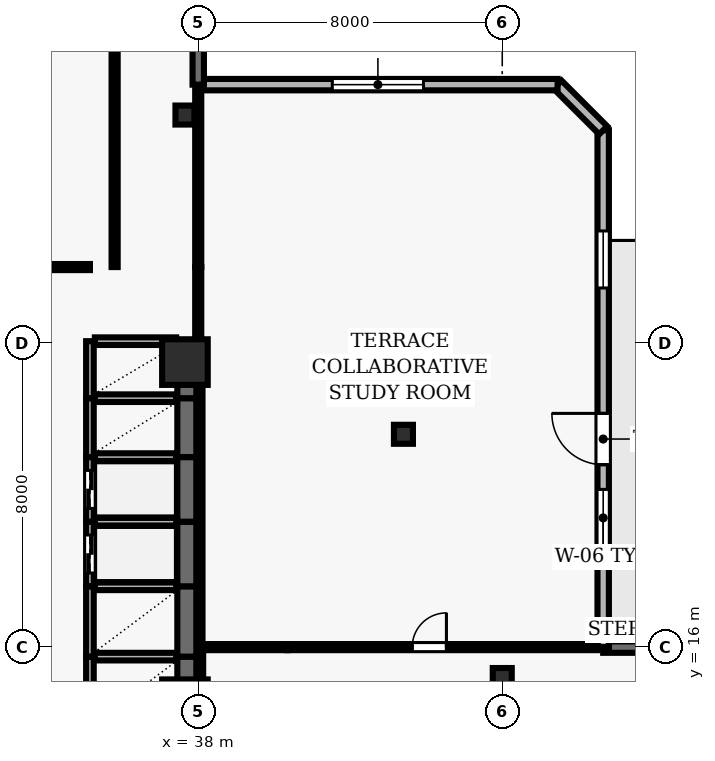
"""IFC4 building model, lengths in metres.
Left out: names, types, materials, properties, quantities, classifications, styles, units other than length and angle.
Written with IfcOpenShell. Run it as: python <this file> out.ifc"""

import sys

from ifc_helpers import new_model, si_unit, direction, frame, frame_2d, origin, origin_2d, place, context, subcontext, project, spatial, rectangle, hollow_rectangle, extrude, element, fill, save


model = new_model("IFC4")
c1 = context("Model", 3, precision=1e-05, world=origin(), true_north=direction((0.0, 1.0)))
c2 = subcontext(c1, "Body", "Model", "MODEL_VIEW")
j1 = project(units=[si_unit("LENGTHUNIT", "METRE"), si_unit("PLANEANGLEUNIT", "RADIAN")], contexts=[c1])
p1 = place(None, origin())
s1 = spatial("IfcSite", under=j1, at=p1, CompositionType="ELEMENT")
p2 = place(p1, origin())
s2 = spatial("IfcBuilding", under=s1, at=p2, CompositionType="ELEMENT")
p3 = place(p2, frame((0.0, 0.0, 103.4)))
s3 = spatial("IfcBuildingStorey", under=s2, at=p3, CompositionType="ELEMENT", Elevation=103.4)
for number, where, z_axis, x_axis in (
    (1, (37.65, 14.55, 0.0), (0.0, 0.0, 1.0), (1.0, 0.0, 0.0)),
    (2, (37.65, 23.5, 0.0), (0.0, 0.0, 1.0), (1.0, 0.0, 0.0)),
):
    element("IfcColumn", number, at=place(p3, frame(where, z_axis=z_axis, x_axis=x_axis)), inside=s3, PredefinedType="COLUMN", context=c2, shape_type="SweptSolid", body=[
        extrude(rectangle(XDim=1.2, YDim=1.2, at=origin_2d()), origin(), (0.0, 0.0, 1.0), 3.9),
    ])
for number, where, z_axis, x_axis in (
    (3, (46.0, 15.2, 0.0), (0.0, 0.0, 1.0), (1.0, 0.0, 0.0)),
    (4, (37.65, 30.0, 0.0), (0.0, 0.0, 1.0), (1.0, 0.0, 0.0)),
    (5, (43.4, 21.6, 0.0), (0.0, 0.0, 1.0), (1.0, 0.0, 0.0)),
):
    element("IfcColumn", number, at=place(p3, frame(where, z_axis=z_axis, x_axis=x_axis)), inside=s3, PredefinedType="COLUMN", context=c2, shape_type="SweptSolid", body=[
        extrude(hollow_rectangle(XDim=0.5, YDim=0.5, WallThickness=0.025, at=origin_2d()), origin(), (0.0, 0.0, 1.0), 3.9),
    ])
p4 = place(p3, frame((68.1, 16.0, 0.0), z_axis=(0.0, 0.0, 1.0), x_axis=(-1.0, 0.0, 0.0)))
e6 = element("IfcWall", 6, at=p4, inside=s3, PredefinedType="SOLIDWALL", context=c2, shape_type="SweptSolid", body=[
    extrude(rectangle(XDim=19.444, YDim=0.3, at=frame_2d((9.722, 0.0))), origin(), (0.0, 0.0, 1.0), 3.69),
])
p5 = place(p4, frame((7.05, 0.0, 0.0)))
e7 = element("IfcOpeningElement", 7, at=p5, cuts=e6, PredefinedType="OPENING", context=c2, shape_type="SweptSolid", body=[
    extrude(rectangle(XDim=1.0, YDim=2.2, at=frame_2d((0.5, 1.1))), frame((0.0, 0.16, 0.0), z_axis=(0.0, -1.0, 0.0), x_axis=(1.0, 0.0, 0.0)), (0.0, 0.0, 1.0), 0.32),
])
p6 = place(p4, frame((2.041, 0.0, 0.9)))
e8 = element("IfcOpeningElement", 8, at=p6, cuts=e6, PredefinedType="OPENING", context=c2, shape_type="SweptSolid", body=[
    extrude(rectangle(XDim=2.4, YDim=1.6, at=frame_2d((1.2, 0.8))), frame((0.0, 0.16, 0.0), z_axis=(0.0, -1.0, 0.0), x_axis=(1.0, 0.0, 0.0)), (0.0, 0.0, 1.0), 0.32),
])
p7 = place(p4, frame((8.522, 0.0, 0.9)))
e9 = element("IfcOpeningElement", 9, at=p7, cuts=e6, PredefinedType="OPENING", context=c2, shape_type="SweptSolid", body=[
    extrude(rectangle(XDim=2.4, YDim=1.6, at=frame_2d((1.2, 0.8))), frame((0.0, 0.16, 0.0), z_axis=(0.0, -1.0, 0.0), x_axis=(1.0, 0.0, 0.0)), (0.0, 0.0, 1.0), 0.32),
])
p8 = place(p4, frame((15.003, 0.0, 0.9)))
e10 = element("IfcOpeningElement", 10, at=p8, cuts=e6, PredefinedType="OPENING", context=c2, shape_type="SweptSolid", body=[
    extrude(rectangle(XDim=2.4, YDim=1.6, at=frame_2d((1.2, 0.8))), frame((0.0, 0.16, 0.0), z_axis=(0.0, -1.0, 0.0), x_axis=(1.0, 0.0, 0.0)), (0.0, 0.0, 1.0), 0.32),
])
p9 = place(p3, frame((48.656, 16.0, 0.0), z_axis=(0.0, 0.0, 1.0), x_axis=(0.0, 1.0, 0.0)))
e11 = element("IfcWall", 11, at=p9, inside=s3, PredefinedType="SOLIDWALL", context=c2, shape_type="SweptSolid", body=[
    extrude(rectangle(XDim=13.6, YDim=0.3, at=frame_2d((6.8, 0.0))), origin(), (0.0, 0.0, 1.0), 3.69),
])
p10 = place(p9, frame((4.8, 0.0, 0.0)))
e12 = element("IfcOpeningElement", 12, at=p10, cuts=e11, PredefinedType="OPENING", context=c2, shape_type="SweptSolid", body=[
    extrude(rectangle(XDim=1.35, YDim=2.2, at=frame_2d((0.675, 1.1))), frame((0.0, 0.16, 0.0), z_axis=(0.0, -1.0, 0.0), x_axis=(1.0, 0.0, 0.0)), (0.0, 0.0, 1.0), 0.32),
])
p11 = place(p9, frame((2.65, 0.0, 0.9)))
e13 = element("IfcOpeningElement", 13, at=p11, cuts=e11, PredefinedType="OPENING", context=c2, shape_type="SweptSolid", body=[
    extrude(rectangle(XDim=1.5, YDim=1.8, at=frame_2d((0.75, 0.9))), frame((0.0, 0.16, 0.0), z_axis=(0.0, -1.0, 0.0), x_axis=(1.0, 0.0, 0.0)), (0.0, 0.0, 1.0), 0.32),
])
p12 = place(p9, frame((9.45, 0.0, 0.9)))
e14 = element("IfcOpeningElement", 14, at=p12, cuts=e11, PredefinedType="OPENING", context=c2, shape_type="SweptSolid", body=[
    extrude(rectangle(XDim=1.5, YDim=1.8, at=frame_2d((0.75, 0.9))), frame((0.0, 0.16, 0.0), z_axis=(0.0, -1.0, 0.0), x_axis=(1.0, 0.0, 0.0)), (0.0, 0.0, 1.0), 0.32),
])
p13 = place(p3, frame((48.656, 29.6, 0.0), z_axis=(0.0, 0.0, 1.0), x_axis=(-0.707106781187, 0.707106781187, 0.0)))
e15 = element("IfcWall", 15, at=p13, inside=s3, PredefinedType="SOLIDWALL", context=c2, shape_type="SweptSolid", body=[
    extrude(rectangle(XDim=1.697, YDim=0.3, at=frame_2d((0.849, 0.0))), origin(), (0.0, 0.0, 1.0), 3.69),
])
p14 = place(p3, frame((47.456, 30.8, 0.0), z_axis=(0.0, 0.0, 1.0), x_axis=(-1.0, 0.0, 0.0)))
e16 = element("IfcWall", 16, at=p14, inside=s3, PredefinedType="SOLIDWALL", context=c2, shape_type="SweptSolid", body=[
    extrude(rectangle(XDim=9.456, YDim=0.3, at=frame_2d((4.728, 0.0))), origin(), (0.0, 0.0, 1.0), 3.69),
])
p15 = place(p14, frame((3.528, 0.0, 0.9)))
e17 = element("IfcOpeningElement", 17, at=p15, cuts=e16, PredefinedType="OPENING", context=c2, shape_type="SweptSolid", body=[
    extrude(rectangle(XDim=2.4, YDim=1.8, at=frame_2d((1.2, 0.9))), frame((0.0, 0.16, 0.0), z_axis=(0.0, -1.0, 0.0), x_axis=(1.0, 0.0, 0.0)), (0.0, 0.0, 1.0), 0.32),
])
p16 = place(p3, frame((38.0, 30.8, 0.0), z_axis=(0.0, 0.0, 1.0), x_axis=(0.0, 1.0, 0.0)))
e18 = element("IfcWall", 18, at=p16, inside=s3, PredefinedType="SOLIDWALL", context=c2, shape_type="SweptSolid", body=[
    extrude(rectangle(XDim=15.3, YDim=0.3, at=frame_2d((7.65, 0.0))), origin(), (0.0, 0.0, 1.0), 3.69),
])
p17 = place(p16, frame((7.25, 0.0, 0.0)))
e19 = element("IfcOpeningElement", 19, at=p17, cuts=e18, PredefinedType="OPENING", context=c2, shape_type="SweptSolid", body=[
    extrude(rectangle(XDim=1.0, YDim=2.2, at=frame_2d((0.5, 1.1))), frame((0.0, 0.16, 0.0), z_axis=(0.0, -1.0, 0.0), x_axis=(1.0, 0.0, 0.0)), (0.0, 0.0, 1.0), 0.32),
])
p18 = place(p16, frame((1.525, 0.0, 0.9)))
e20 = element("IfcOpeningElement", 20, at=p18, cuts=e18, PredefinedType="OPENING", context=c2, shape_type="SweptSolid", body=[
    extrude(rectangle(XDim=2.8, YDim=1.8, at=frame_2d((1.4, 0.9))), frame((0.0, 0.16, 0.0), z_axis=(0.0, -1.0, 0.0), x_axis=(1.0, 0.0, 0.0)), (0.0, 0.0, 1.0), 0.32),
])
p19 = place(p16, frame((10.975, 0.0, 0.9)))
e21 = element("IfcOpeningElement", 21, at=p19, cuts=e18, PredefinedType="OPENING", context=c2, shape_type="SweptSolid", body=[
    extrude(rectangle(XDim=2.8, YDim=1.8, at=frame_2d((1.4, 0.9))), frame((0.0, 0.16, 0.0), z_axis=(0.0, -1.0, 0.0), x_axis=(1.0, 0.0, 0.0)), (0.0, 0.0, 1.0), 0.32),
])
p20 = place(p3, frame((35.15, 15.75, 0.0), z_axis=(0.0, 0.0, 1.0), x_axis=(0.0, -1.0, 0.0)))
e22 = element("IfcWall", 22, at=p20, inside=s3, PredefinedType="SOLIDWALL", context=c2, shape_type="SweptSolid", body=[
    extrude(rectangle(XDim=1.85, YDim=0.2, at=frame_2d((0.925, 0.0))), origin(), (0.0, 0.0, 1.0), 3.69),
])
p21 = place(p3, frame((37.7, 13.9, 0.0), z_axis=(0.0, 0.0, 1.0), x_axis=(0.0, 1.0, 0.0)))
e23 = element("IfcWall", 23, at=p21, inside=s3, PredefinedType="SHEAR", context=c2, shape_type="SweptSolid", body=[
    extrude(rectangle(XDim=1.85, YDim=0.5, at=frame_2d((0.925, 0.0))), origin(), (0.0, 0.0, 1.0), 3.69),
])
p22 = place(p3, frame((37.42, 15.75, 0.0), z_axis=(0.0, 0.0, 1.0), x_axis=(-1.0, 0.0, 0.0)))
e24 = element("IfcWall", 24, at=p22, inside=s3, PredefinedType="SOLIDWALL", context=c2, shape_type="SweptSolid", body=[
    extrude(rectangle(XDim=2.14, YDim=0.2, at=frame_2d((1.07, 0.0))), origin(), (0.0, 0.0, 1.0), 3.69),
])
p23 = place(p3, frame((35.15, 17.6, 0.0), z_axis=(0.0, 0.0, 1.0), x_axis=(0.0, -1.0, 0.0)))
e25 = element("IfcWall", 25, at=p23, inside=s3, PredefinedType="SOLIDWALL", context=c2, shape_type="SweptSolid", body=[
    extrude(rectangle(XDim=1.85, YDim=0.2, at=frame_2d((0.925, 0.0))), origin(), (0.0, 0.0, 1.0), 3.69),
])
p24 = place(p3, frame((37.7, 15.75, 0.0), z_axis=(0.0, 0.0, 1.0), x_axis=(0.0, 1.0, 0.0)))
e26 = element("IfcWall", 26, at=p24, inside=s3, PredefinedType="SHEAR", context=c2, shape_type="SweptSolid", body=[
    extrude(rectangle(XDim=1.85, YDim=0.5, at=frame_2d((0.925, 0.0))), origin(), (0.0, 0.0, 1.0), 3.69),
])
p25 = place(p3, frame((37.42, 17.6, 0.0), z_axis=(0.0, 0.0, 1.0), x_axis=(-1.0, 0.0, 0.0)))
e27 = element("IfcWall", 27, at=p25, inside=s3, PredefinedType="SOLIDWALL", context=c2, shape_type="SweptSolid", body=[
    extrude(rectangle(XDim=2.14, YDim=0.2, at=frame_2d((1.07, 0.0))), origin(), (0.0, 0.0, 1.0), 3.69),
])
p26 = place(p3, frame((35.15, 19.3, 0.0), z_axis=(0.0, 0.0, 1.0), x_axis=(0.0, -1.0, 0.0)))
e28 = element("IfcWall", 28, at=p26, inside=s3, PredefinedType="SOLIDWALL", context=c2, shape_type="SweptSolid", body=[
    extrude(rectangle(XDim=1.7, YDim=0.2, at=frame_2d((0.85, 0.0))), origin(), (0.0, 0.0, 1.0), 3.69),
])
p27 = place(p26, frame((0.35, 0.0, 0.0)))
e29 = element("IfcOpeningElement", 29, at=p27, cuts=e28, PredefinedType="OPENING", context=c2, shape_type="SweptSolid", body=[
    extrude(rectangle(XDim=1.0, YDim=2.1, at=frame_2d((0.5, 1.05))), frame((0.0, 0.11, 0.0), z_axis=(0.0, -1.0, 0.0), x_axis=(1.0, 0.0, 0.0)), (0.0, 0.0, 1.0), 0.22),
])
p28 = place(p3, frame((37.7, 17.6, 0.0), z_axis=(0.0, 0.0, 1.0), x_axis=(0.0, 1.0, 0.0)))
e30 = element("IfcWall", 30, at=p28, inside=s3, PredefinedType="SHEAR", context=c2, shape_type="SweptSolid", body=[
    extrude(rectangle(XDim=1.7, YDim=0.5, at=frame_2d((0.85, 0.0))), origin(), (0.0, 0.0, 1.0), 3.69),
])
p29 = place(p3, frame((37.42, 19.3, 0.0), z_axis=(0.0, 0.0, 1.0), x_axis=(-1.0, 0.0, 0.0)))
e31 = element("IfcWall", 31, at=p29, inside=s3, PredefinedType="SOLIDWALL", context=c2, shape_type="SweptSolid", body=[
    extrude(rectangle(XDim=2.14, YDim=0.2, at=frame_2d((1.07, 0.0))), origin(), (0.0, 0.0, 1.0), 3.69),
])
p30 = place(p3, frame((35.15, 21.0, 0.0), z_axis=(0.0, 0.0, 1.0), x_axis=(0.0, -1.0, 0.0)))
e32 = element("IfcWall", 32, at=p30, inside=s3, PredefinedType="SOLIDWALL", context=c2, shape_type="SweptSolid", body=[
    extrude(rectangle(XDim=1.7, YDim=0.2, at=frame_2d((0.85, 0.0))), origin(), (0.0, 0.0, 1.0), 3.69),
])
p31 = place(p30, frame((0.35, 0.0, 0.0)))
e33 = element("IfcOpeningElement", 33, at=p31, cuts=e32, PredefinedType="OPENING", context=c2, shape_type="SweptSolid", body=[
    extrude(rectangle(XDim=1.0, YDim=2.1, at=frame_2d((0.5, 1.05))), frame((0.0, 0.11, 0.0), z_axis=(0.0, -1.0, 0.0), x_axis=(1.0, 0.0, 0.0)), (0.0, 0.0, 1.0), 0.22),
])
p32 = place(p3, frame((37.7, 19.3, 0.0), z_axis=(0.0, 0.0, 1.0), x_axis=(0.0, 1.0, 0.0)))
e34 = element("IfcWall", 34, at=p32, inside=s3, PredefinedType="SHEAR", context=c2, shape_type="SweptSolid", body=[
    extrude(rectangle(XDim=1.7, YDim=0.5, at=frame_2d((0.85, 0.0))), origin(), (0.0, 0.0, 1.0), 3.69),
])
p33 = place(p3, frame((37.42, 21.0, 0.0), z_axis=(0.0, 0.0, 1.0), x_axis=(-1.0, 0.0, 0.0)))
e35 = element("IfcWall", 35, at=p33, inside=s3, PredefinedType="SOLIDWALL", context=c2, shape_type="SweptSolid", body=[
    extrude(rectangle(XDim=2.14, YDim=0.2, at=frame_2d((1.07, 0.0))), origin(), (0.0, 0.0, 1.0), 3.69),
])
p34 = place(p3, frame((35.15, 22.55, 0.0), z_axis=(0.0, 0.0, 1.0), x_axis=(0.0, -1.0, 0.0)))
e36 = element("IfcWall", 36, at=p34, inside=s3, PredefinedType="SOLIDWALL", context=c2, shape_type="SweptSolid", body=[
    extrude(rectangle(XDim=1.55, YDim=0.2, at=frame_2d((0.775, 0.0))), origin(), (0.0, 0.0, 1.0), 3.69),
])
p35 = place(p3, frame((37.7, 21.0, 0.0), z_axis=(0.0, 0.0, 1.0), x_axis=(0.0, 1.0, 0.0)))
e37 = element("IfcWall", 37, at=p35, inside=s3, PredefinedType="SHEAR", context=c2, shape_type="SweptSolid", body=[
    extrude(rectangle(XDim=1.55, YDim=0.5, at=frame_2d((0.775, 0.0))), origin(), (0.0, 0.0, 1.0), 3.69),
])
p36 = place(p3, frame((37.42, 22.55, 0.0), z_axis=(0.0, 0.0, 1.0), x_axis=(-1.0, 0.0, 0.0)))
e38 = element("IfcWall", 38, at=p36, inside=s3, PredefinedType="SOLIDWALL", context=c2, shape_type="SweptSolid", body=[
    extrude(rectangle(XDim=2.14, YDim=0.2, at=frame_2d((1.07, 0.0))), origin(), (0.0, 0.0, 1.0), 3.69),
])
p37 = place(p3, frame((35.15, 24.05, 0.0), z_axis=(0.0, 0.0, 1.0), x_axis=(0.0, -1.0, 0.0)))
e39 = element("IfcWall", 39, at=p37, inside=s3, PredefinedType="SOLIDWALL", context=c2, shape_type="SweptSolid", body=[
    extrude(rectangle(XDim=1.5, YDim=0.2, at=frame_2d((0.75, 0.0))), origin(), (0.0, 0.0, 1.0), 3.69),
])
p38 = place(p3, frame((37.7, 22.55, 0.0), z_axis=(0.0, 0.0, 1.0), x_axis=(0.0, 1.0, 0.0)))
e40 = element("IfcWall", 40, at=p38, inside=s3, PredefinedType="SHEAR", context=c2, shape_type="SweptSolid", body=[
    extrude(rectangle(XDim=1.5, YDim=0.5, at=frame_2d((0.75, 0.0))), origin(), (0.0, 0.0, 1.0), 3.69),
])
p39 = place(p3, frame((37.42, 24.05, 0.0), z_axis=(0.0, 0.0, 1.0), x_axis=(-1.0, 0.0, 0.0)))
e41 = element("IfcWall", 41, at=p39, inside=s3, PredefinedType="SOLIDWALL", context=c2, shape_type="SweptSolid", body=[
    extrude(rectangle(XDim=2.14, YDim=0.2, at=frame_2d((1.07, 0.0))), origin(), (0.0, 0.0, 1.0), 3.69),
])
p40 = place(p3, frame((35.15, 26.0, 0.0), z_axis=(0.0, 0.0, 1.0), x_axis=(-1.0, 0.0, 0.0)))
e42 = element("IfcWall", 42, at=p40, inside=s3, PredefinedType="PARTITIONING", context=c2, shape_type="SweptSolid", body=[
    extrude(rectangle(XDim=13.005, YDim=0.16, at=frame_2d((6.502, 0.0))), origin(), (0.0, 0.0, 1.0), 3.69),
])
p41 = place(p40, frame((6.002, 0.0, 0.0)))
e43 = element("IfcOpeningElement", 43, at=p41, cuts=e42, PredefinedType="OPENING", context=c2, shape_type="SweptSolid", body=[
    extrude(rectangle(XDim=1.0, YDim=2.1, at=frame_2d((0.5, 1.05))), frame((0.0, 0.09, 0.0), z_axis=(0.0, -1.0, 0.0), x_axis=(1.0, 0.0, 0.0)), (0.0, 0.0, 1.0), 0.18),
])
p42 = place(p3, frame((40.35, 16.0, 0.0), z_axis=(0.0, 0.0, 1.0), x_axis=(-1.0, 0.0, 0.0)))
e44 = element("IfcWall", 44, at=p42, inside=s3, PredefinedType="PARTITIONING", context=c2, shape_type="SweptSolid", body=[
    extrude(rectangle(XDim=2.3, YDim=0.16, at=frame_2d((1.15, 0.0))), origin(), (0.0, 0.0, 1.0), 3.69),
])
p43 = place(p3, frame((40.35, 16.0, 0.0), z_axis=(0.0, 0.0, 1.0), x_axis=(1.0, 0.0, 0.0)))
e45 = element("IfcWall", 45, at=p43, inside=s3, PredefinedType="PARTITIONING", context=c2, shape_type="SweptSolid", body=[
    extrude(rectangle(XDim=8.161, YDim=0.16, at=frame_2d((4.081, 0.0))), origin(), (0.0, 0.0, 1.0), 3.69),
])
p44 = place(p43, frame((3.281, 0.0, 0.0)))
e46 = element("IfcOpeningElement", 46, at=p44, cuts=e45, PredefinedType="OPENING", context=c2, shape_type="SweptSolid", body=[
    extrude(rectangle(XDim=0.9, YDim=2.1, at=frame_2d((0.45, 1.05))), frame((0.0, 0.09, 0.0), z_axis=(0.0, -1.0, 0.0), x_axis=(1.0, 0.0, 0.0)), (0.0, 0.0, 1.0), 0.18),
])
p45 = place(p3, frame((35.8, 33.612, 0.0), z_axis=(0.0, 0.0, 1.0), x_axis=(0.0, -1.0, 0.0)))
e47 = element("IfcWall", 47, at=p45, inside=s3, PredefinedType="PARTITIONING", context=c2, shape_type="SweptSolid", body=[
    extrude(rectangle(XDim=7.612, YDim=0.16, at=frame_2d((3.806, 0.0))), origin(), (0.0, 0.0, 1.0), 3.69),
])
p46 = place(p3, frame((38.0, 24.05, 0.0), z_axis=(0.0, 0.0, 1.0), x_axis=(0.0, 1.0, 0.0)))
e48 = element("IfcWall", 48, at=p46, inside=s3, PredefinedType="PARTITIONING", context=c2, shape_type="SweptSolid", body=[
    extrude(rectangle(XDim=1.95, YDim=0.16, at=frame_2d((0.975, 0.0))), origin(), (0.0, 0.0, 1.0), 3.074),
])
p47 = place(p3, frame((38.0, 26.0, 0.0), z_axis=(0.0, 0.0, 1.0), x_axis=(0.0, 1.0, 0.0)))
e49 = element("IfcWall", 49, at=p47, inside=s3, PredefinedType="PARTITIONING", context=c2, shape_type="SweptSolid", body=[
    extrude(rectangle(XDim=4.655, YDim=0.16, at=frame_2d((2.328, 0.0))), origin(), (0.0, 0.0, 1.0), 3.074),
])
p48 = place(p3, frame((38.05, 15.925, 0.0), z_axis=(0.0, 0.0, 1.0), x_axis=(0.0, -1.0, 0.0)))
e50 = element("IfcWall", 50, at=p48, inside=s3, PredefinedType="PARTITIONING", context=c2, shape_type="SweptSolid", body=[
    extrude(rectangle(XDim=6.375, YDim=0.16, at=frame_2d((3.188, 0.0))), origin(), (0.0, 0.0, 1.0), 3.074),
])
p49 = place(p3, frame((38.05, 24.05, 0.0), z_axis=(0.0, 0.0, 1.0), x_axis=(0.0, -1.0, 0.0)))
e51 = element("IfcWall", 51, at=p49, inside=s3, PredefinedType="PARTITIONING", context=c2, shape_type="SweptSolid", body=[
    extrude(rectangle(XDim=7.975, YDim=0.125, at=frame_2d((3.988, 0.0))), origin(), (0.0, 0.0, 1.0), 3.074),
])
p50 = place(p10, origin())
e52 = element("IfcDoor", 52, at=p50, inside=s3, OperationType="SINGLE_SWING_RIGHT", PredefinedType="DOOR", context=c2, shape_type="SweptSolid", body=[
    extrude(rectangle(XDim=1.35, YDim=2.2, at=frame_2d((0.675, 1.1))), frame((0.0, 0.025, 0.0), z_axis=(0.0, -1.0, 0.0), x_axis=(1.0, 0.0, 0.0)), (0.0, 0.0, 1.0), 0.05),
])
fill(e12, e52)
p51 = place(p11, origin())
e53 = element("IfcWindow", 53, at=p51, inside=s3, PartitioningType="SINGLE_PANEL", PredefinedType="WINDOW", context=c2, shape_type="SweptSolid", body=[
    extrude(rectangle(XDim=1.5, YDim=1.8, at=frame_2d((0.75, 0.9))), frame((0.0, 0.03, 0.0), z_axis=(0.0, -1.0, 0.0), x_axis=(1.0, 0.0, 0.0)), (0.0, 0.0, 1.0), 0.06),
])
fill(e13, e53)
p52 = place(p12, origin())
e54 = element("IfcWindow", 54, at=p52, inside=s3, PartitioningType="SINGLE_PANEL", PredefinedType="WINDOW", context=c2, shape_type="SweptSolid", body=[
    extrude(rectangle(XDim=1.5, YDim=1.8, at=frame_2d((0.75, 0.9))), frame((0.0, 0.03, 0.0), z_axis=(0.0, -1.0, 0.0), x_axis=(1.0, 0.0, 0.0)), (0.0, 0.0, 1.0), 0.06),
])
fill(e14, e54)
p53 = place(p15, origin())
e55 = element("IfcWindow", 55, at=p53, inside=s3, PartitioningType="SINGLE_PANEL", PredefinedType="WINDOW", context=c2, shape_type="SweptSolid", body=[
    extrude(rectangle(XDim=2.4, YDim=1.8, at=frame_2d((1.2, 0.9))), frame((0.0, 0.03, 0.0), z_axis=(0.0, -1.0, 0.0), x_axis=(1.0, 0.0, 0.0)), (0.0, 0.0, 1.0), 0.06),
])
fill(e17, e55)
p54 = place(p27, origin())
e56 = element("IfcDoor", 56, at=p54, inside=s3, OperationType="DOUBLE_DOOR_SLIDING", PredefinedType="DOOR", context=c2, shape_type="SweptSolid", body=[
    extrude(rectangle(XDim=1.0, YDim=2.1, at=frame_2d((0.5, 1.05))), frame((0.0, 0.025, 0.0), z_axis=(0.0, -1.0, 0.0), x_axis=(1.0, 0.0, 0.0)), (0.0, 0.0, 1.0), 0.05),
])
fill(e29, e56)
p55 = place(p31, origin())
e57 = element("IfcDoor", 57, at=p55, inside=s3, OperationType="DOUBLE_DOOR_SLIDING", PredefinedType="DOOR", context=c2, shape_type="SweptSolid", body=[
    extrude(rectangle(XDim=1.0, YDim=2.1, at=frame_2d((0.5, 1.05))), frame((0.0, 0.025, 0.0), z_axis=(0.0, -1.0, 0.0), x_axis=(1.0, 0.0, 0.0)), (0.0, 0.0, 1.0), 0.05),
])
fill(e33, e57)
p56 = place(p44, origin())
e58 = element("IfcDoor", 58, at=p56, inside=s3, OperationType="SINGLE_SWING_RIGHT", PredefinedType="DOOR", context=c2, shape_type="SweptSolid", body=[
    extrude(rectangle(XDim=0.9, YDim=2.1, at=frame_2d((0.45, 1.05))), frame((0.0, 0.025, 0.0), z_axis=(0.0, -1.0, 0.0), x_axis=(1.0, 0.0, 0.0)), (0.0, 0.0, 1.0), 0.05),
])
fill(e46, e58)
save(model, sys.argv[1])
